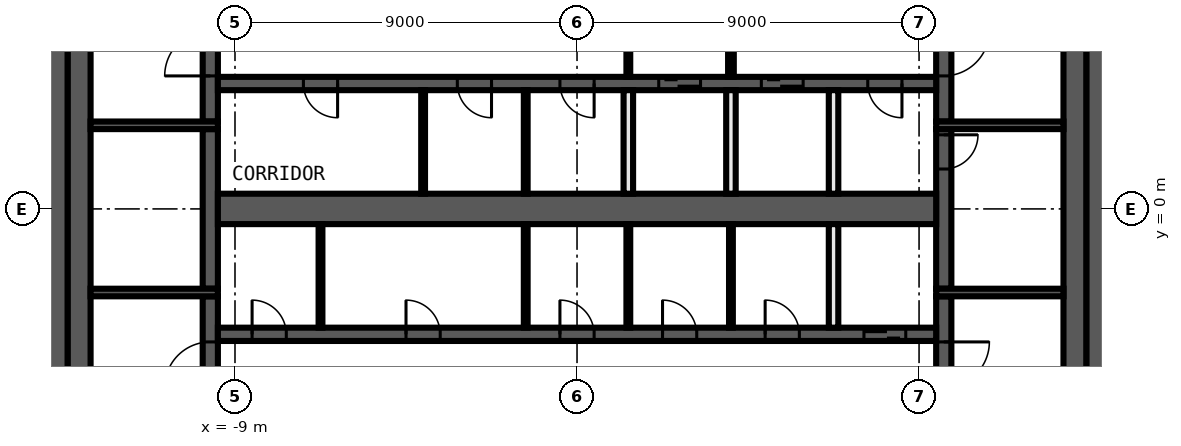
"""IFC4 building model, lengths in metres.
Left out: names, types, materials, properties, quantities, classifications, styles, units other than length and angle.
Written with IfcOpenShell. Run it as: python <this file> out.ifc"""

import sys

from ifc_helpers import new_model, si_unit, direction, frame, frame_2d, origin, place, context, subcontext, project, spatial, rectangle, extrude, element, fill, save


model = new_model("IFC4")
c1 = context("Model", 3, precision=1e-05, world=origin(), true_north=direction((0.0, 1.0)))
c2 = subcontext(c1, "Body", "Model", "MODEL_VIEW")
j1 = project(units=[si_unit("LENGTHUNIT", "METRE"), si_unit("PLANEANGLEUNIT", "RADIAN")], contexts=[c1])
p1 = place(None, origin())
s1 = spatial("IfcSite", under=j1, at=p1, CompositionType="ELEMENT")
p2 = place(p1, origin())
s2 = spatial("IfcBuilding", under=s1, at=p2, CompositionType="ELEMENT")
p3 = place(p2, frame((0.0, 0.0, 302.6)))
s3 = spatial("IfcBuildingStorey", under=s2, at=p3, CompositionType="ELEMENT", Elevation=302.6)
for number, where, z_axis, x_axis in (
    (1, (13.7, 10.4, 0.0), (0.0, 0.0, 1.0), (0.0, -1.0, 0.0)),
    (2, (-13.7, -10.4, 0.0), (0.0, 0.0, 1.0), (0.0, 1.0, 0.0)),
):
    element("IfcWall", number, at=place(p3, frame(where, z_axis=z_axis, x_axis=x_axis)), inside=s3, PredefinedType="SHEAR", context=c2, shape_type="SweptSolid", body=[
        extrude(rectangle(XDim=20.8, YDim=0.6, at=frame_2d((10.4, 0.0))), origin(), (0.0, 0.0, 1.0), 3.82),
    ])
for number, where, z_axis, x_axis in (
    (3, (13.1, 9.8, 0.0), (0.0, 0.0, 1.0), (0.0, -1.0, 0.0)),
    (4, (-13.1, -9.8, 0.0), (0.0, 0.0, 1.0), (0.0, 1.0, 0.0)),
):
    element("IfcWall", number, at=place(p3, frame(where, z_axis=z_axis, x_axis=x_axis)), inside=s3, PredefinedType="SHEAR", context=c2, shape_type="SweptSolid", body=[
        extrude(rectangle(XDim=19.6, YDim=0.6, at=frame_2d((9.8, 0.0))), origin(), (0.0, 0.0, 1.0), 3.82),
    ])
p4 = place(p3, frame((9.65, -2.3, 0.0), z_axis=(0.0, 0.0, 1.0), x_axis=(0.0, -1.0, 0.0)))
e5 = element("IfcWall", 5, at=p4, inside=s3, PredefinedType="SHEAR", context=c2, shape_type="SweptSolid", body=[
    extrude(rectangle(XDim=7.5, YDim=0.4, at=frame_2d((3.75, 0.0))), origin(), (0.0, 0.0, 1.0), 3.82),
])
p5 = place(p4, frame((1.2, 0.0, 0.0)))
e6 = element("IfcOpeningElement", 6, at=p5, cuts=e5, PredefinedType="OPENING", context=c2, shape_type="SweptSolid", body=[
    extrude(rectangle(XDim=1.2, YDim=2.1, at=frame_2d((0.6, 1.05))), frame((0.0, 0.21, 0.0), z_axis=(0.0, -1.0, 0.0), x_axis=(1.0, 0.0, 0.0)), (0.0, 0.0, 1.0), 0.42),
])
p6 = place(p3, frame((9.65, 2.1, 0.0), z_axis=(0.0, 0.0, 1.0), x_axis=(0.0, -1.0, 0.0)))
e7 = element("IfcWall", 7, at=p6, inside=s3, PredefinedType="SHEAR", context=c2, shape_type="SweptSolid", body=[
    extrude(rectangle(XDim=4.2, YDim=0.4, at=frame_2d((2.1, 0.0))), origin(), (0.0, 0.0, 1.0), 3.82),
])
p7 = place(p6, frame((0.15, 0.0, 0.0)))
e8 = element("IfcOpeningElement", 8, at=p7, cuts=e7, PredefinedType="OPENING", context=c2, shape_type="SweptSolid", body=[
    extrude(rectangle(XDim=0.9, YDim=2.1, at=frame_2d((0.45, 1.05))), frame((0.0, 0.21, 0.0), z_axis=(0.0, -1.0, 0.0), x_axis=(1.0, 0.0, 0.0)), (0.0, 0.0, 1.0), 0.42),
])
p8 = place(p3, frame((9.65, 9.8, 0.0), z_axis=(0.0, 0.0, 1.0), x_axis=(0.0, -1.0, 0.0)))
e9 = element("IfcWall", 9, at=p8, inside=s3, PredefinedType="SHEAR", context=c2, shape_type="SweptSolid", body=[
    extrude(rectangle(XDim=7.5, YDim=0.4, at=frame_2d((3.75, 0.0))), origin(), (0.0, 0.0, 1.0), 3.82),
])
p9 = place(p8, frame((5.1, 0.0, 0.0)))
e10 = element("IfcOpeningElement", 10, at=p9, cuts=e9, PredefinedType="OPENING", context=c2, shape_type="SweptSolid", body=[
    extrude(rectangle(XDim=1.2, YDim=2.1, at=frame_2d((0.6, 1.05))), frame((0.0, 0.21, 0.0), z_axis=(0.0, -1.0, 0.0), x_axis=(1.0, 0.0, 0.0)), (0.0, 0.0, 1.0), 0.42),
])
p10 = place(p3, frame((-9.65, -9.8, 0.0), z_axis=(0.0, 0.0, 1.0), x_axis=(0.0, 1.0, 0.0)))
e11 = element("IfcWall", 11, at=p10, inside=s3, PredefinedType="SHEAR", context=c2, shape_type="SweptSolid", body=[
    extrude(rectangle(XDim=7.5, YDim=0.4, at=frame_2d((3.75, 0.0))), origin(), (0.0, 0.0, 1.0), 3.82),
])
p11 = place(p10, frame((5.1, 0.0, 0.0)))
e12 = element("IfcOpeningElement", 12, at=p11, cuts=e11, PredefinedType="OPENING", context=c2, shape_type="SweptSolid", body=[
    extrude(rectangle(XDim=1.2, YDim=2.1, at=frame_2d((0.6, 1.05))), frame((0.0, 0.21, 0.0), z_axis=(0.0, -1.0, 0.0), x_axis=(1.0, 0.0, 0.0)), (0.0, 0.0, 1.0), 0.42),
])
p12 = place(p3, frame((-9.65, -2.1, 0.0), z_axis=(0.0, 0.0, 1.0), x_axis=(0.0, 1.0, 0.0)))
e13 = element("IfcWall", 13, at=p12, inside=s3, PredefinedType="SHEAR", context=c2, shape_type="SweptSolid", body=[
    extrude(rectangle(XDim=4.2, YDim=0.4, at=frame_2d((2.1, 0.0))), origin(), (0.0, 0.0, 1.0), 3.82),
])
p13 = place(p3, frame((-9.65, 2.3, 0.0), z_axis=(0.0, 0.0, 1.0), x_axis=(0.0, 1.0, 0.0)))
e14 = element("IfcWall", 14, at=p13, inside=s3, PredefinedType="SHEAR", context=c2, shape_type="SweptSolid", body=[
    extrude(rectangle(XDim=7.5, YDim=0.4, at=frame_2d((3.75, 0.0))), origin(), (0.0, 0.0, 1.0), 3.82),
])
p14 = place(p13, frame((1.2, 0.0, 0.0)))
e15 = element("IfcOpeningElement", 15, at=p14, cuts=e14, PredefinedType="OPENING", context=c2, shape_type="SweptSolid", body=[
    extrude(rectangle(XDim=1.2, YDim=2.1, at=frame_2d((0.6, 1.05))), frame((0.0, 0.21, 0.0), z_axis=(0.0, -1.0, 0.0), x_axis=(1.0, 0.0, 0.0)), (0.0, 0.0, 1.0), 0.42),
])
for number, where, z_axis, x_axis in (
    (16, (9.45, 2.2, 0.0), (0.0, 0.0, 1.0), (1.0, 0.0, 0.0)),
    (17, (-9.45, 2.2, 0.0), (0.0, 0.0, 1.0), (-1.0, 0.0, 0.0)),
    (18, (9.45, -2.2, 0.0), (0.0, 0.0, 1.0), (1.0, 0.0, 0.0)),
    (19, (-9.45, -2.2, 0.0), (0.0, 0.0, 1.0), (-1.0, 0.0, 0.0)),
):
    element("IfcWall", number, at=place(p3, frame(where, z_axis=z_axis, x_axis=x_axis)), inside=s3, PredefinedType="SHEAR", context=c2, shape_type="SweptSolid", body=[
        extrude(rectangle(XDim=3.35, YDim=0.2, at=frame_2d((1.675, 0.0))), origin(), (0.0, 0.0, 1.0), 3.82),
    ])
p15 = place(p3, frame((9.45, 3.3, 0.0), z_axis=(0.0, 0.0, 1.0), x_axis=(-1.0, 0.0, 0.0)))
e20 = element("IfcWall", 20, at=p15, inside=s3, PredefinedType="SHEAR", context=c2, shape_type="SweptSolid", body=[
    extrude(rectangle(XDim=18.9, YDim=0.35, at=frame_2d((9.45, 0.0))), origin(), (0.0, 0.0, 1.0), 3.82),
])
p16 = place(p15, frame((6.2, 0.0, 0.0)))
e21 = element("IfcOpeningElement", 21, at=p16, cuts=e20, PredefinedType="OPENING", context=c2, shape_type="SweptSolid", body=[
    extrude(rectangle(XDim=1.1, YDim=2.1, at=frame_2d((0.55, 1.05))), frame((0.0, 0.185, 0.0), z_axis=(0.0, -1.0, 0.0), x_axis=(1.0, 0.0, 0.0)), (0.0, 0.0, 1.0), 0.37),
])
p17 = place(p15, frame((3.5, 0.0, 0.0)))
e22 = element("IfcOpeningElement", 22, at=p17, cuts=e20, PredefinedType="OPENING", context=c2, shape_type="SweptSolid", body=[
    extrude(rectangle(XDim=1.1, YDim=2.1, at=frame_2d((0.55, 1.05))), frame((0.0, 0.185, 0.0), z_axis=(0.0, -1.0, 0.0), x_axis=(1.0, 0.0, 0.0)), (0.0, 0.0, 1.0), 0.37),
])
p18 = place(p15, frame((0.9, 0.0, 0.0)))
e23 = element("IfcOpeningElement", 23, at=p18, cuts=e20, PredefinedType="OPENING", context=c2, shape_type="SweptSolid", body=[
    extrude(rectangle(XDim=0.9, YDim=2.1, at=frame_2d((0.45, 1.05))), frame((0.0, 0.185, 0.0), z_axis=(0.0, -1.0, 0.0), x_axis=(1.0, 0.0, 0.0)), (0.0, 0.0, 1.0), 0.37),
])
p19 = place(p15, frame((15.75, 0.0, 0.0)))
e24 = element("IfcOpeningElement", 24, at=p19, cuts=e20, PredefinedType="OPENING", context=c2, shape_type="SweptSolid", body=[
    extrude(rectangle(XDim=0.9, YDim=2.1, at=frame_2d((0.45, 1.05))), frame((0.0, 0.185, 0.0), z_axis=(0.0, -1.0, 0.0), x_axis=(1.0, 0.0, 0.0)), (0.0, 0.0, 1.0), 0.37),
])
p20 = place(p15, frame((11.7, 0.0, 0.0)))
e25 = element("IfcOpeningElement", 25, at=p20, cuts=e20, PredefinedType="OPENING", context=c2, shape_type="SweptSolid", body=[
    extrude(rectangle(XDim=0.9, YDim=2.1, at=frame_2d((0.45, 1.05))), frame((0.0, 0.185, 0.0), z_axis=(0.0, -1.0, 0.0), x_axis=(1.0, 0.0, 0.0)), (0.0, 0.0, 1.0), 0.37),
])
p21 = place(p15, frame((9.0, 0.0, 0.0)))
e26 = element("IfcOpeningElement", 26, at=p21, cuts=e20, PredefinedType="OPENING", context=c2, shape_type="SweptSolid", body=[
    extrude(rectangle(XDim=0.9, YDim=2.1, at=frame_2d((0.45, 1.05))), frame((0.0, 0.185, 0.0), z_axis=(0.0, -1.0, 0.0), x_axis=(1.0, 0.0, 0.0)), (0.0, 0.0, 1.0), 0.37),
])
p22 = place(p3, frame((-9.45, -3.3, 0.0), z_axis=(0.0, 0.0, 1.0), x_axis=(1.0, 0.0, 0.0)))
e27 = element("IfcWall", 27, at=p22, inside=s3, PredefinedType="SHEAR", context=c2, shape_type="SweptSolid", body=[
    extrude(rectangle(XDim=18.9, YDim=0.35, at=frame_2d((9.45, 0.0))), origin(), (0.0, 0.0, 1.0), 3.82),
])
p23 = place(p22, frame((17.0, 0.0, 0.0)))
e28 = element("IfcOpeningElement", 28, at=p23, cuts=e27, PredefinedType="OPENING", context=c2, shape_type="SweptSolid", body=[
    extrude(rectangle(XDim=1.1, YDim=2.1, at=frame_2d((0.55, 1.05))), frame((0.0, 0.185, 0.0), z_axis=(0.0, -1.0, 0.0), x_axis=(1.0, 0.0, 0.0)), (0.0, 0.0, 1.0), 0.37),
])
p24 = place(p22, frame((0.9, 0.0, 0.0)))
e29 = element("IfcOpeningElement", 29, at=p24, cuts=e27, PredefinedType="OPENING", context=c2, shape_type="SweptSolid", body=[
    extrude(rectangle(XDim=0.9, YDim=2.1, at=frame_2d((0.45, 1.05))), frame((0.0, 0.185, 0.0), z_axis=(0.0, -1.0, 0.0), x_axis=(1.0, 0.0, 0.0)), (0.0, 0.0, 1.0), 0.37),
])
p25 = place(p22, frame((4.95, 0.0, 0.0)))
e30 = element("IfcOpeningElement", 30, at=p25, cuts=e27, PredefinedType="OPENING", context=c2, shape_type="SweptSolid", body=[
    extrude(rectangle(XDim=0.9, YDim=2.1, at=frame_2d((0.45, 1.05))), frame((0.0, 0.185, 0.0), z_axis=(0.0, -1.0, 0.0), x_axis=(1.0, 0.0, 0.0)), (0.0, 0.0, 1.0), 0.37),
])
p26 = place(p22, frame((9.0, 0.0, 0.0)))
e31 = element("IfcOpeningElement", 31, at=p26, cuts=e27, PredefinedType="OPENING", context=c2, shape_type="SweptSolid", body=[
    extrude(rectangle(XDim=0.9, YDim=2.1, at=frame_2d((0.45, 1.05))), frame((0.0, 0.185, 0.0), z_axis=(0.0, -1.0, 0.0), x_axis=(1.0, 0.0, 0.0)), (0.0, 0.0, 1.0), 0.37),
])
p27 = place(p22, frame((11.7, 0.0, 0.0)))
e32 = element("IfcOpeningElement", 32, at=p27, cuts=e27, PredefinedType="OPENING", context=c2, shape_type="SweptSolid", body=[
    extrude(rectangle(XDim=0.9, YDim=2.1, at=frame_2d((0.45, 1.05))), frame((0.0, 0.185, 0.0), z_axis=(0.0, -1.0, 0.0), x_axis=(1.0, 0.0, 0.0)), (0.0, 0.0, 1.0), 0.37),
])
p28 = place(p22, frame((14.4, 0.0, 0.0)))
e33 = element("IfcOpeningElement", 33, at=p28, cuts=e27, PredefinedType="OPENING", context=c2, shape_type="SweptSolid", body=[
    extrude(rectangle(XDim=0.9, YDim=2.1, at=frame_2d((0.45, 1.05))), frame((0.0, 0.185, 0.0), z_axis=(0.0, -1.0, 0.0), x_axis=(1.0, 0.0, 0.0)), (0.0, 0.0, 1.0), 0.37),
])
p29 = place(p3, frame((-9.45, 0.0, 0.0), z_axis=(0.0, 0.0, 1.0), x_axis=(1.0, 0.0, 0.0)))
e34 = element("IfcWall", 34, at=p29, inside=s3, PredefinedType="SHEAR", context=c2, shape_type="SweptSolid", body=[
    extrude(rectangle(XDim=18.9, YDim=0.8, at=frame_2d((9.45, 0.0))), origin(), (0.0, 0.0, 1.0), 3.82),
])
for number, where, z_axis, x_axis in (
    (35, (6.75, -3.125, 0.0), (0.0, 0.0, 1.0), (0.0, 1.0, 0.0)),
    (36, (6.75, 0.4, 0.0), (0.0, 0.0, 1.0), (0.0, 1.0, 0.0)),
):
    element("IfcWall", number, at=place(p3, frame(where, z_axis=z_axis, x_axis=x_axis)), inside=s3, PredefinedType="SOLIDWALL", context=c2, shape_type="SweptSolid", body=[
        extrude(rectangle(XDim=2.725, YDim=0.25, at=frame_2d((1.363, 0.0))), origin(), (0.0, 0.0, 1.0), 3.82),
    ])
p30 = place(p3, frame((4.05, 6.725, 0.0), z_axis=(0.0, 0.0, 1.0), x_axis=(0.0, -1.0, 0.0)))
e37 = element("IfcWall", 37, at=p30, inside=s3, PredefinedType="PARTITIONING", context=c2, shape_type="SweptSolid", body=[
    extrude(rectangle(XDim=3.25, YDim=0.15, at=frame_2d((1.625, 0.0))), origin(), (0.0, 0.0, 1.0), 3.82),
])
p31 = place(p30, frame((1.025, 0.0, 0.0)))
e38 = element("IfcOpeningElement", 38, at=p31, cuts=e37, PredefinedType="OPENING", context=c2, shape_type="SweptSolid", body=[
    extrude(rectangle(XDim=1.2, YDim=2.1, at=frame_2d((0.6, 1.05))), frame((0.0, 0.085, 0.0), z_axis=(0.0, -1.0, 0.0), x_axis=(1.0, 0.0, 0.0)), (0.0, 0.0, 1.0), 0.17),
])
p32 = place(p3, frame((4.05, -3.125, 0.0), z_axis=(0.0, 0.0, 1.0), x_axis=(0.0, 1.0, 0.0)))
e39 = element("IfcWall", 39, at=p32, inside=s3, PredefinedType="PARTITIONING", context=c2, shape_type="SweptSolid", body=[
    extrude(rectangle(XDim=2.725, YDim=0.1, at=frame_2d((1.363, 0.0))), origin(), (0.0, 0.0, 1.0), 3.82),
])
p33 = place(p3, frame((4.05, 0.4, 0.0), z_axis=(0.0, 0.0, 1.0), x_axis=(0.0, 1.0, 0.0)))
e40 = element("IfcWall", 40, at=p33, inside=s3, PredefinedType="SOLIDWALL", context=c2, shape_type="SweptSolid", body=[
    extrude(rectangle(XDim=2.725, YDim=0.25, at=frame_2d((1.363, 0.0))), origin(), (0.0, 0.0, 1.0), 3.82),
])
p34 = place(p3, frame((1.35, -3.125, 0.0), z_axis=(0.0, 0.0, 1.0), x_axis=(0.0, 1.0, 0.0)))
e41 = element("IfcWall", 41, at=p34, inside=s3, PredefinedType="PARTITIONING", context=c2, shape_type="SweptSolid", body=[
    extrude(rectangle(XDim=2.725, YDim=0.1, at=frame_2d((1.363, 0.0))), origin(), (0.0, 0.0, 1.0), 3.82),
])
p35 = place(p3, frame((1.35, 6.725, 0.0), z_axis=(0.0, 0.0, 1.0), x_axis=(0.0, -1.0, 0.0)))
e42 = element("IfcWall", 42, at=p35, inside=s3, PredefinedType="PARTITIONING", context=c2, shape_type="SweptSolid", body=[
    extrude(rectangle(XDim=3.25, YDim=0.1, at=frame_2d((1.625, 0.0))), origin(), (0.0, 0.0, 1.0), 3.82),
])
p36 = place(p35, frame((1.025, 0.0, 0.0)))
e43 = element("IfcOpeningElement", 43, at=p36, cuts=e42, PredefinedType="OPENING", context=c2, shape_type="SweptSolid", body=[
    extrude(rectangle(XDim=1.2, YDim=2.1, at=frame_2d((0.6, 1.05))), frame((0.0, 0.06, 0.0), z_axis=(0.0, -1.0, 0.0), x_axis=(1.0, 0.0, 0.0)), (0.0, 0.0, 1.0), 0.12),
])
p37 = place(p3, frame((1.35, 0.4, 0.0), z_axis=(0.0, 0.0, 1.0), x_axis=(0.0, 1.0, 0.0)))
e44 = element("IfcWall", 44, at=p37, inside=s3, PredefinedType="SOLIDWALL", context=c2, shape_type="SweptSolid", body=[
    extrude(rectangle(XDim=2.725, YDim=0.25, at=frame_2d((1.363, 0.0))), origin(), (0.0, 0.0, 1.0), 3.82),
])
for number, where, z_axis, x_axis in (
    (45, (-1.35, -3.125, 0.0), (0.0, 0.0, 1.0), (0.0, 1.0, 0.0)),
    (46, (-1.35, 0.4, 0.0), (0.0, 0.0, 1.0), (0.0, 1.0, 0.0)),
    (47, (-4.05, 0.4, 0.0), (0.0, 0.0, 1.0), (0.0, 1.0, 0.0)),
    (48, (-6.75, -3.125, 0.0), (0.0, 0.0, 1.0), (0.0, 1.0, 0.0)),
):
    element("IfcWall", number, at=place(p3, frame(where, z_axis=z_axis, x_axis=x_axis)), inside=s3, PredefinedType="PARTITIONING", context=c2, shape_type="SweptSolid", body=[
        extrude(rectangle(XDim=2.725, YDim=0.1, at=frame_2d((1.363, 0.0))), origin(), (0.0, 0.0, 1.0), 3.82),
    ])
p38 = place(p7, origin())
e49 = element("IfcDoor", 49, at=p38, inside=s3, OperationType="SINGLE_SWING_RIGHT", PredefinedType="DOOR", context=c2, shape_type="SweptSolid", body=[
    extrude(rectangle(XDim=0.9, YDim=2.1, at=frame_2d((0.45, 1.05))), frame((0.0, 0.025, 0.0), z_axis=(0.0, -1.0, 0.0), x_axis=(1.0, 0.0, 0.0)), (0.0, 0.0, 1.0), 0.05),
])
fill(e8, e49)
p39 = place(p16, origin())
e50 = element("IfcDoor", 50, at=p39, inside=s3, OperationType="DOUBLE_DOOR_SLIDING", PredefinedType="DOOR", context=c2, shape_type="SweptSolid", body=[
    extrude(rectangle(XDim=1.1, YDim=2.1, at=frame_2d((0.55, 1.05))), frame((0.0, 0.025, 0.0), z_axis=(0.0, -1.0, 0.0), x_axis=(1.0, 0.0, 0.0)), (0.0, 0.0, 1.0), 0.05),
])
fill(e21, e50)
p40 = place(p17, origin())
e51 = element("IfcDoor", 51, at=p40, inside=s3, OperationType="DOUBLE_DOOR_SLIDING", PredefinedType="DOOR", context=c2, shape_type="SweptSolid", body=[
    extrude(rectangle(XDim=1.1, YDim=2.1, at=frame_2d((0.55, 1.05))), frame((0.0, 0.025, 0.0), z_axis=(0.0, -1.0, 0.0), x_axis=(1.0, 0.0, 0.0)), (0.0, 0.0, 1.0), 0.05),
])
fill(e22, e51)
p41 = place(p18, origin())
e52 = element("IfcDoor", 52, at=p41, inside=s3, OperationType="SINGLE_SWING_LEFT", PredefinedType="DOOR", context=c2, shape_type="SweptSolid", body=[
    extrude(rectangle(XDim=0.9, YDim=2.1, at=frame_2d((0.45, 1.05))), frame((0.0, 0.025, 0.0), z_axis=(0.0, -1.0, 0.0), x_axis=(1.0, 0.0, 0.0)), (0.0, 0.0, 1.0), 0.05),
])
fill(e23, e52)
p42 = place(p23, origin())
e53 = element("IfcDoor", 53, at=p42, inside=s3, OperationType="DOUBLE_DOOR_SLIDING", PredefinedType="DOOR", context=c2, shape_type="SweptSolid", body=[
    extrude(rectangle(XDim=1.1, YDim=2.1, at=frame_2d((0.55, 1.05))), frame((0.0, 0.025, 0.0), z_axis=(0.0, -1.0, 0.0), x_axis=(1.0, 0.0, 0.0)), (0.0, 0.0, 1.0), 0.05),
])
fill(e28, e53)
p43 = place(p19, origin())
e54 = element("IfcDoor", 54, at=p43, inside=s3, OperationType="SINGLE_SWING_RIGHT", PredefinedType="DOOR", context=c2, shape_type="SweptSolid", body=[
    extrude(rectangle(XDim=0.9, YDim=2.1, at=frame_2d((0.45, 1.05))), frame((0.0, 0.025, 0.0), z_axis=(0.0, -1.0, 0.0), x_axis=(1.0, 0.0, 0.0)), (0.0, 0.0, 1.0), 0.05),
])
fill(e24, e54)
p44 = place(p20, origin())
e55 = element("IfcDoor", 55, at=p44, inside=s3, OperationType="SINGLE_SWING_LEFT", PredefinedType="DOOR", context=c2, shape_type="SweptSolid", body=[
    extrude(rectangle(XDim=0.9, YDim=2.1, at=frame_2d((0.45, 1.05))), frame((0.0, 0.025, 0.0), z_axis=(0.0, -1.0, 0.0), x_axis=(1.0, 0.0, 0.0)), (0.0, 0.0, 1.0), 0.05),
])
fill(e25, e55)
p45 = place(p21, origin())
e56 = element("IfcDoor", 56, at=p45, inside=s3, OperationType="SINGLE_SWING_RIGHT", PredefinedType="DOOR", context=c2, shape_type="SweptSolid", body=[
    extrude(rectangle(XDim=0.9, YDim=2.1, at=frame_2d((0.45, 1.05))), frame((0.0, 0.025, 0.0), z_axis=(0.0, -1.0, 0.0), x_axis=(1.0, 0.0, 0.0)), (0.0, 0.0, 1.0), 0.05),
])
fill(e26, e56)
p46 = place(p24, origin())
e57 = element("IfcDoor", 57, at=p46, inside=s3, OperationType="SINGLE_SWING_LEFT", PredefinedType="DOOR", context=c2, shape_type="SweptSolid", body=[
    extrude(rectangle(XDim=0.9, YDim=2.1, at=frame_2d((0.45, 1.05))), frame((0.0, 0.025, 0.0), z_axis=(0.0, -1.0, 0.0), x_axis=(1.0, 0.0, 0.0)), (0.0, 0.0, 1.0), 0.05),
])
fill(e29, e57)
p47 = place(p25, origin())
e58 = element("IfcDoor", 58, at=p47, inside=s3, OperationType="SINGLE_SWING_RIGHT", PredefinedType="DOOR", context=c2, shape_type="SweptSolid", body=[
    extrude(rectangle(XDim=0.9, YDim=2.1, at=frame_2d((0.45, 1.05))), frame((0.0, 0.025, 0.0), z_axis=(0.0, -1.0, 0.0), x_axis=(1.0, 0.0, 0.0)), (0.0, 0.0, 1.0), 0.05),
])
fill(e30, e58)
p48 = place(p26, origin())
e59 = element("IfcDoor", 59, at=p48, inside=s3, OperationType="SINGLE_SWING_LEFT", PredefinedType="DOOR", context=c2, shape_type="SweptSolid", body=[
    extrude(rectangle(XDim=0.9, YDim=2.1, at=frame_2d((0.45, 1.05))), frame((0.0, 0.025, 0.0), z_axis=(0.0, -1.0, 0.0), x_axis=(1.0, 0.0, 0.0)), (0.0, 0.0, 1.0), 0.05),
])
fill(e31, e59)
p49 = place(p27, origin())
e60 = element("IfcDoor", 60, at=p49, inside=s3, OperationType="SINGLE_SWING_RIGHT", PredefinedType="DOOR", context=c2, shape_type="SweptSolid", body=[
    extrude(rectangle(XDim=0.9, YDim=2.1, at=frame_2d((0.45, 1.05))), frame((0.0, 0.025, 0.0), z_axis=(0.0, -1.0, 0.0), x_axis=(1.0, 0.0, 0.0)), (0.0, 0.0, 1.0), 0.05),
])
fill(e32, e60)
p50 = place(p28, origin())
e61 = element("IfcDoor", 61, at=p50, inside=s3, OperationType="SINGLE_SWING_LEFT", PredefinedType="DOOR", context=c2, shape_type="SweptSolid", body=[
    extrude(rectangle(XDim=0.9, YDim=2.1, at=frame_2d((0.45, 1.05))), frame((0.0, 0.025, 0.0), z_axis=(0.0, -1.0, 0.0), x_axis=(1.0, 0.0, 0.0)), (0.0, 0.0, 1.0), 0.05),
])
fill(e33, e61)
p51 = place(p9, origin())
e62 = element("IfcDoor", 62, at=p51, inside=s3, OperationType="SINGLE_SWING_LEFT", PredefinedType="DOOR", context=c2, shape_type="SweptSolid", body=[
    extrude(rectangle(XDim=1.2, YDim=2.1, at=frame_2d((0.6, 1.05))), frame((0.0, 0.025, 0.0), z_axis=(0.0, -1.0, 0.0), x_axis=(1.0, 0.0, 0.0)), (0.0, 0.0, 1.0), 0.05),
])
fill(e10, e62)
p52 = place(p14, origin())
e63 = element("IfcDoor", 63, at=p52, inside=s3, OperationType="SINGLE_SWING_RIGHT", PredefinedType="DOOR", context=c2, shape_type="SweptSolid", body=[
    extrude(rectangle(XDim=1.2, YDim=2.1, at=frame_2d((0.6, 1.05))), frame((0.0, 0.025, 0.0), z_axis=(0.0, -1.0, 0.0), x_axis=(1.0, 0.0, 0.0)), (0.0, 0.0, 1.0), 0.05),
])
fill(e15, e63)
p53 = place(p5, origin())
e64 = element("IfcDoor", 64, at=p53, inside=s3, OperationType="SINGLE_SWING_RIGHT", PredefinedType="DOOR", context=c2, shape_type="SweptSolid", body=[
    extrude(rectangle(XDim=1.2, YDim=2.1, at=frame_2d((0.6, 1.05))), frame((0.0, 0.025, 0.0), z_axis=(0.0, -1.0, 0.0), x_axis=(1.0, 0.0, 0.0)), (0.0, 0.0, 1.0), 0.05),
])
fill(e6, e64)
p54 = place(p11, origin())
e65 = element("IfcDoor", 65, at=p54, inside=s3, OperationType="SINGLE_SWING_LEFT", PredefinedType="DOOR", context=c2, shape_type="SweptSolid", body=[
    extrude(rectangle(XDim=1.2, YDim=2.1, at=frame_2d((0.6, 1.05))), frame((0.0, 0.025, 0.0), z_axis=(0.0, -1.0, 0.0), x_axis=(1.0, 0.0, 0.0)), (0.0, 0.0, 1.0), 0.05),
])
fill(e12, e65)
save(model, sys.argv[1])
